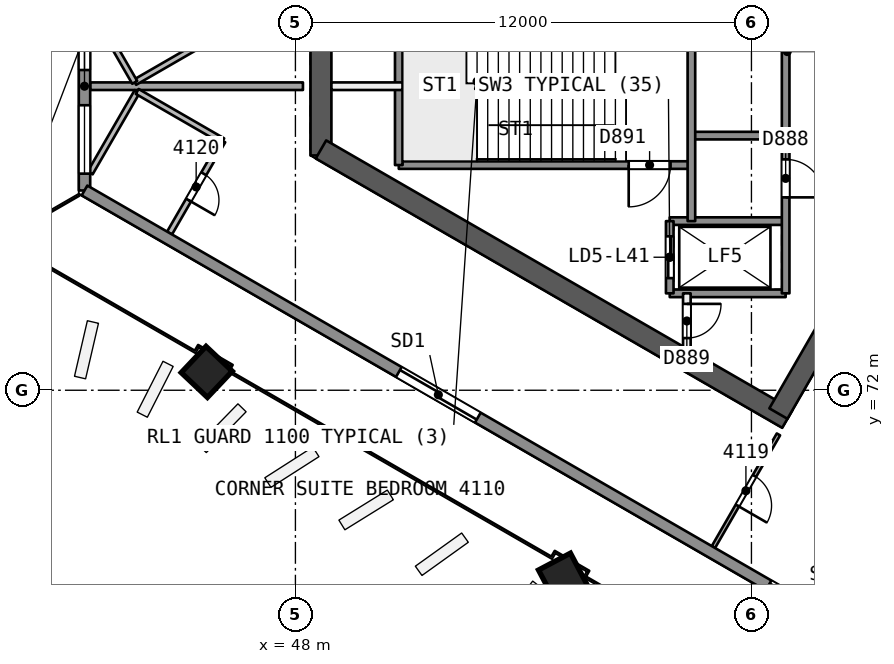
"""IFC4 building model, lengths in metres.
Left out: names, types, materials, properties, quantities, classifications, styles, units other than length and angle.
Written with IfcOpenShell. Run it as: python <this file> out.ifc"""

import sys

from ifc_helpers import new_model, si_unit, direction, frame, frame_2d, origin, origin_2d, place, context, subcontext, project, spatial, rectangle, extrude, element, fill, save


model = new_model("IFC4")
c1 = context("Model", 3, precision=1e-05, world=origin(), true_north=direction((0.0, 1.0)))
c2 = subcontext(c1, "Body", "Model", "MODEL_VIEW")
j1 = project(units=[si_unit("LENGTHUNIT", "METRE"), si_unit("PLANEANGLEUNIT", "RADIAN")], contexts=[c1])
p1 = place(None, origin())
s1 = spatial("IfcSite", under=j1, at=p1, CompositionType="ELEMENT")
p2 = place(p1, origin())
s2 = spatial("IfcBuilding", under=s1, at=p2, CompositionType="ELEMENT")
p3 = place(p2, frame((0.0, 0.0, 171.1)))
s3 = spatial("IfcBuildingStorey", under=s2, at=p3, CompositionType="ELEMENT", Elevation=171.1)
p4 = place(p3, frame((65.682, 80.0, 0.0), z_axis=(0.0, 0.0, 1.0), x_axis=(-0.500000202252, 0.866025287014, 0.0)))
e1 = element("IfcWall", 1, at=p4, inside=s3, PredefinedType="SHEAR", context=c2, shape_type="SweptSolid", body=[
    extrude(rectangle(XDim=10.221, YDim=0.55, at=frame_2d((5.111, 0.0))), origin(), (0.0, 0.0, 1.0), 3.7),
])
p5 = place(p4, frame((0.791, 0.0, 0.0)))
e2 = element("IfcOpeningElement", 2, at=p5, cuts=e1, PredefinedType="OPENING", context=c2, shape_type="SweptSolid", body=[
    extrude(rectangle(XDim=1.2, YDim=2.1, at=frame_2d((0.6, 1.05))), frame((0.0, 0.286, 0.0), z_axis=(0.0, -1.0, 0.0), x_axis=(1.0, 0.0, 0.0)), (0.0, 0.0, 1.0), 0.571),
])
p6 = place(p3, frame((48.672, 81.664, 0.0), z_axis=(0.0, 0.0, 1.0), x_axis=(0.0, -1.0, 0.0)))
e3 = element("IfcWall", 3, at=p6, inside=s3, PredefinedType="SHEAR", context=c2, shape_type="SweptSolid", body=[
    extrude(rectangle(XDim=3.487, YDim=0.55, at=frame_2d((1.743, 0.0))), origin(), (0.0, 0.0, 1.0), 3.7),
])
p7 = place(p3, frame((48.672, 78.336, 0.0), z_axis=(0.0, 0.0, 1.0), x_axis=(0.866023530946, -0.500003243837, 0.0)))
e4 = element("IfcWall", 4, at=p7, inside=s3, PredefinedType="SHEAR", context=c2, shape_type="SweptSolid", body=[
    extrude(rectangle(XDim=14.175, YDim=0.55, at=frame_2d((7.087, 0.0))), origin(), (0.0, 0.0, 1.0), 3.7),
])
p8 = place(p3, frame((60.709, 71.386, 0.0), z_axis=(0.0, 0.0, 1.0), x_axis=(0.500015938302, 0.866016201606, 0.0)))
e5 = element("IfcWall", 5, at=p8, inside=s3, PredefinedType="SHEAR", context=c2, shape_type="SweptSolid", body=[
    extrude(rectangle(XDim=10.105, YDim=0.55, at=frame_2d((5.053, 0.0))), origin(), (0.0, 0.0, 1.0), 3.7),
])
p9 = place(p8, frame((7.955, 0.0, 0.0)))
e6 = element("IfcOpeningElement", 6, at=p9, cuts=e5, PredefinedType="OPENING", context=c2, shape_type="SweptSolid", body=[
    extrude(rectangle(XDim=1.2, YDim=2.1, at=frame_2d((0.6, 1.05))), frame((0.0, 0.286, 0.0), z_axis=(0.0, -1.0, 0.0), x_axis=(1.0, 0.0, 0.0)), (0.0, 0.0, 1.0), 0.571),
])
p10 = place(p3, frame((45.632, 72.474, 0.0), z_axis=(0.02855911485, 0.006793507689, 0.999569019734), x_axis=(-0.865318766308, 0.500768301983, 0.021319953197)))
e7 = element("IfcColumn", 7, at=p10, inside=s3, PredefinedType="COLUMN", context=c2, shape_type="SweptSolid", body=[
    extrude(rectangle(XDim=0.95, YDim=0.95, at=origin_2d()), origin(), (0.0, 0.0, 1.0), 3.702),
])
p11 = place(p3, frame((55.016, 67.057, 0.0), z_axis=(0.019328501455, 0.012204002625, 0.999738701537), x_axis=(-0.8669111048, 0.498348409501, 0.010677037146)))
e8 = element("IfcColumn", 8, at=p11, inside=s3, PredefinedType="COLUMN", context=c2, shape_type="SweptSolid", body=[
    extrude(rectangle(XDim=0.95, YDim=0.95, at=origin_2d()), origin(), (0.0, 0.0, 1.0), 3.701),
])
p12 = place(p3, frame((46.023, 81.401, 0.0), z_axis=(0.0, 0.0, 1.0), x_axis=(-0.866021400173, -0.500006934395, 0.0)))
e9 = element("IfcWall", 9, at=p12, inside=s3, PredefinedType="PARTITIONING", context=c2, shape_type="SweptSolid", body=[
    extrude(rectangle(XDim=2.6, YDim=0.15, at=frame_2d((1.3, 0.0))), origin(), (0.0, 0.0, 1.0), 3.25),
])
p13 = place(p3, frame((43.771, 80.101, 0.0), z_axis=(0.0, 0.0, 1.0), x_axis=(-0.499989728273, 0.866031334088, 0.0)))
e10 = element("IfcWall", 10, at=p13, inside=s3, PredefinedType="PARTITIONING", context=c2, shape_type="SweptSolid", body=[
    extrude(rectangle(XDim=2.346, YDim=0.15, at=frame_2d((1.173, 0.0))), origin(), (0.0, 0.0, 1.0), 3.25),
])
p14 = place(p3, frame((42.599, 80.0, 0.0), z_axis=(0.0, 0.0, 1.0), x_axis=(1.0, 0.0, 0.0)))
e11 = element("IfcWall", 11, at=p14, inside=s3, PredefinedType="PARTITIONING", context=c2, shape_type="SweptSolid", body=[
    extrude(rectangle(XDim=5.599, YDim=0.2, at=frame_2d((2.8, 0.0))), origin(), (0.0, 0.0, 1.0), 3.25),
])
p15 = place(p3, frame((60.71, 70.838, 0.0), z_axis=(0.0, 0.0, 1.0), x_axis=(-0.499981725576, -0.866035954271, 0.0)))
e12 = element("IfcWall", 12, at=p15, inside=s3, PredefinedType="PARTITIONING", context=c2, shape_type="SweptSolid", body=[
    extrude(rectangle(XDim=3.424, YDim=0.1, at=frame_2d((1.712, 0.0))), origin(), (0.0, 0.0, 1.0), 3.25),
])
p16 = place(p15, frame((1.262, 0.0, 0.0)))
e13 = element("IfcOpeningElement", 13, at=p16, cuts=e12, PredefinedType="OPENING", context=c2, shape_type="SweptSolid", body=[
    extrude(rectangle(XDim=0.9, YDim=2.1, at=frame_2d((0.45, 1.05))), frame((0.0, 0.061, 0.0), z_axis=(0.0, -1.0, 0.0), x_axis=(1.0, 0.0, 0.0)), (0.0, 0.0, 1.0), 0.121),
])
p17 = place(p3, frame((42.599, 77.718, 0.0), z_axis=(0.0, 0.0, 1.0), x_axis=(0.499978546328, 0.866037789714, 0.0)))
e14 = element("IfcWall", 14, at=p17, inside=s3, PredefinedType="PARTITIONING", context=c2, shape_type="SweptSolid", body=[
    extrude(rectangle(XDim=2.476, YDim=0.15, at=frame_2d((1.238, 0.0))), origin(), (0.0, 0.0, 1.0), 3.25),
])
p18 = place(p3, frame((43.836, 79.862, 0.0), z_axis=(0.0, 0.0, 1.0), x_axis=(0.866021400173, -0.500006934395, 0.0)))
e15 = element("IfcWall", 15, at=p18, inside=s3, PredefinedType="PARTITIONING", context=c2, shape_type="SweptSolid", body=[
    extrude(rectangle(XDim=2.6, YDim=0.15, at=frame_2d((1.3, 0.0))), origin(), (0.0, 0.0, 1.0), 3.25),
])
p19 = place(p3, frame((46.088, 78.562, 0.0), z_axis=(0.0, 0.0, 1.0), x_axis=(-0.500001639361, -0.866024457297, 0.0)))
e16 = element("IfcWall", 16, at=p19, inside=s3, PredefinedType="PARTITIONING", context=c2, shape_type="SweptSolid", body=[
    extrude(rectangle(XDim=2.801, YDim=0.15, at=frame_2d((1.4, 0.0))), origin(), (0.0, 0.0, 1.0), 3.25),
])
p20 = place(p19, frame((1.0, 0.0, 0.0)))
e17 = element("IfcOpeningElement", 17, at=p20, cuts=e16, PredefinedType="OPENING", context=c2, shape_type="SweptSolid", body=[
    extrude(rectangle(XDim=0.8, YDim=2.1, at=frame_2d((0.4, 1.05))), frame((0.0, 0.085, 0.0), z_axis=(0.0, -1.0, 0.0), x_axis=(1.0, 0.0, 0.0)), (0.0, 0.0, 1.0), 0.171),
])
p21 = place(p3, frame((42.45, 77.256, 0.0), z_axis=(0.0, 0.0, 1.0), x_axis=(0.0, 1.0, 0.0)))
e18 = element("IfcWall", 18, at=p21, inside=s3, PredefinedType="SOLIDWALL", context=c2, shape_type="SweptSolid", body=[
    extrude(rectangle(XDim=5.487, YDim=0.3, at=frame_2d((2.744, 0.0))), origin(), (0.0, 0.0, 1.0), 3.25),
])
p22 = place(p21, frame((3.169, 0.0, 0.9)))
e19 = element("IfcOpeningElement", 19, at=p22, cuts=e18, PredefinedType="OPENING", context=c2, shape_type="SweptSolid", body=[
    extrude(rectangle(XDim=1.8, YDim=1.5, at=frame_2d((0.9, 0.75))), frame((0.0, 0.161, 0.0), z_axis=(0.0, -1.0, 0.0), x_axis=(1.0, 0.0, 0.0)), (0.0, 0.0, 1.0), 0.321),
])
p23 = place(p21, frame((0.443, 0.0, 0.9)))
e20 = element("IfcOpeningElement", 20, at=p23, cuts=e18, PredefinedType="OPENING", context=c2, shape_type="SweptSolid", body=[
    extrude(rectangle(XDim=1.8, YDim=1.5, at=frame_2d((0.9, 0.75))), frame((0.0, 0.161, 0.0), z_axis=(0.0, -1.0, 0.0), x_axis=(1.0, 0.0, 0.0)), (0.0, 0.0, 1.0), 0.321),
])
p24 = place(p3, frame((88.899, 50.439, 0.0), z_axis=(0.0, 0.0, 1.0), x_axis=(-0.866024128163, 0.500002209434, 0.0)))
e21 = element("IfcWall", 21, at=p24, inside=s3, PredefinedType="SOLIDWALL", context=c2, shape_type="SweptSolid", body=[
    extrude(rectangle(XDim=53.635, YDim=0.3, at=frame_2d((26.817, 0.0))), origin(), (0.0, 0.0, 1.0), 3.25),
])
p25 = place(p24, frame((30.45, 0.0, 0.0)))
e22 = element("IfcOpeningElement", 22, at=p25, cuts=e21, PredefinedType="OPENING", context=c2, shape_type="SweptSolid", body=[
    extrude(rectangle(XDim=2.4, YDim=2.4, at=frame_2d((1.2, 1.2))), frame((0.0, 0.161, 0.0), z_axis=(0.0, -1.0, 0.0), x_axis=(1.0, 0.0, 0.0)), (0.0, 0.0, 1.0), 0.321),
])
p26 = place(p24, frame((41.683, 0.0, 0.0)))
e23 = element("IfcOpeningElement", 23, at=p26, cuts=e21, PredefinedType="OPENING", context=c2, shape_type="SweptSolid", body=[
    extrude(rectangle(XDim=2.4, YDim=2.4, at=frame_2d((1.2, 1.2))), frame((0.0, 0.161, 0.0), z_axis=(0.0, -1.0, 0.0), x_axis=(1.0, 0.0, 0.0)), (0.0, 0.0, 1.0), 0.321),
])
p27 = place(p24, frame((10.295, 0.0, 0.0)))
e24 = element("IfcOpeningElement", 24, at=p27, cuts=e21, PredefinedType="OPENING", context=c2, shape_type="SweptSolid", body=[
    extrude(rectangle(XDim=2.4, YDim=2.4, at=frame_2d((1.2, 1.2))), frame((0.0, 0.161, 0.0), z_axis=(0.0, -1.0, 0.0), x_axis=(1.0, 0.0, 0.0)), (0.0, 0.0, 1.0), 0.321),
])
p28 = place(p24, frame((24.982, 0.0, 0.9)))
e25 = element("IfcOpeningElement", 25, at=p28, cuts=e21, PredefinedType="OPENING", context=c2, shape_type="SweptSolid", body=[
    extrude(rectangle(XDim=1.8, YDim=1.5, at=frame_2d((0.9, 0.75))), frame((0.0, 0.161, 0.0), z_axis=(0.0, -1.0, 0.0), x_axis=(1.0, 0.0, 0.0)), (0.0, 0.0, 1.0), 0.321),
])
p29 = place(p3, frame((50.82, 80.0, 0.0), z_axis=(0.0, 0.0, 1.0), x_axis=(-1.0, 0.0, 0.0)))
e26 = element("IfcWall", 26, at=p29, inside=s3, PredefinedType="PARTITIONING", context=c2, shape_type="SweptSolid", body=[
    extrude(rectangle(XDim=1.873, YDim=0.2, at=frame_2d((0.937, 0.0))), origin(), (0.0, 0.0, 1.0), 3.25),
])
p30 = place(p3, frame((60.9, 78.7, 0.0), z_axis=(0.0, 0.0, 1.0), x_axis=(-1.0, 0.0, 0.0)))
e27 = element("IfcWall", 27, at=p30, inside=s3, PredefinedType="SOLIDWALL", context=c2, shape_type="SweptSolid", body=[
    extrude(rectangle(XDim=2.48, YDim=0.2, at=frame_2d((1.24, 0.0))), origin(), (0.0, 0.0, 1.0), 3.25),
])
p31 = place(p3, frame((58.42, 77.925, 0.0), z_axis=(0.0, 0.0, 1.0), x_axis=(-1.0, 0.0, 0.0)))
e28 = element("IfcWall", 28, at=p31, inside=s3, PredefinedType="SOLIDWALL", context=c2, shape_type="SweptSolid", body=[
    extrude(rectangle(XDim=7.7, YDim=0.2, at=frame_2d((3.85, 0.0))), origin(), (0.0, 0.0, 1.0), 3.25),
])
p32 = place(p31, frame((0.55, 0.0, 0.0)))
e29 = element("IfcOpeningElement", 29, at=p32, cuts=e28, PredefinedType="OPENING", context=c2, shape_type="SweptSolid", body=[
    extrude(rectangle(XDim=1.1, YDim=2.1, at=frame_2d((0.55, 1.05))), frame((0.0, 0.11, 0.0), z_axis=(0.0, -1.0, 0.0), x_axis=(1.0, 0.0, 0.0)), (0.0, 0.0, 1.0), 0.221),
])
for number, where, z_axis, x_axis in (
    (30, (60.9, 76.45, 0.0), (0.0, 0.0, 1.0), (-1.0, 0.0, 0.0)),
    (31, (60.9, 74.55, 0.0), (0.0, 0.0, 1.0), (-1.0, 0.0, 0.0)),
):
    element("IfcWall", number, at=place(p3, frame(where, z_axis=z_axis, x_axis=x_axis)), inside=s3, PredefinedType="SOLIDWALL", context=c2, shape_type="SweptSolid", body=[
        extrude(rectangle(XDim=3.05, YDim=0.2, at=frame_2d((1.525, 0.0))), origin(), (0.0, 0.0, 1.0), 3.25),
    ])
p33 = place(p3, frame((60.9, 85.45, 0.0), z_axis=(0.0, 0.0, 1.0), x_axis=(0.0, -1.0, 0.0)))
e32 = element("IfcWall", 32, at=p33, inside=s3, PredefinedType="SOLIDWALL", context=c2, shape_type="SweptSolid", body=[
    extrude(rectangle(XDim=10.9, YDim=0.2, at=frame_2d((5.45, 0.0))), origin(), (0.0, 0.0, 1.0), 3.25),
])
p34 = place(p33, frame((2.875, 0.0, 0.0)))
e33 = element("IfcOpeningElement", 33, at=p34, cuts=e32, PredefinedType="OPENING", context=c2, shape_type="SweptSolid", body=[
    extrude(rectangle(XDim=1.0, YDim=2.1, at=frame_2d((0.5, 1.05))), frame((0.0, 0.11, 0.0), z_axis=(0.0, -1.0, 0.0), x_axis=(1.0, 0.0, 0.0)), (0.0, 0.0, 1.0), 0.221),
])
p35 = place(p33, frame((7.375, 0.0, 0.0)))
e34 = element("IfcOpeningElement", 34, at=p35, cuts=e32, PredefinedType="OPENING", context=c2, shape_type="SweptSolid", body=[
    extrude(rectangle(XDim=1.0, YDim=2.1, at=frame_2d((0.5, 1.05))), frame((0.0, 0.11, 0.0), z_axis=(0.0, -1.0, 0.0), x_axis=(1.0, 0.0, 0.0)), (0.0, 0.0, 1.0), 0.221),
])
p36 = place(p3, frame((58.42, 86.974, 0.0), z_axis=(0.0, 0.0, 1.0), x_axis=(0.0, -1.0, 0.0)))
e35 = element("IfcWall", 35, at=p36, inside=s3, PredefinedType="SOLIDWALL", context=c2, shape_type="SweptSolid", body=[
    extrude(rectangle(XDim=10.524, YDim=0.2, at=frame_2d((5.262, 0.0))), origin(), (0.0, 0.0, 1.0), 3.25),
])
p37 = place(p36, frame((0.312, 0.0, 0.0)))
e36 = element("IfcOpeningElement", 36, at=p37, cuts=e35, PredefinedType="OPENING", context=c2, shape_type="SweptSolid", body=[
    extrude(rectangle(XDim=0.9, YDim=2.1, at=frame_2d((0.45, 1.05))), frame((0.0, 0.11, 0.0), z_axis=(0.0, -1.0, 0.0), x_axis=(1.0, 0.0, 0.0)), (0.0, 0.0, 1.0), 0.221),
])
p38 = place(p3, frame((58.3, 74.55, 0.0), z_axis=(0.0, 0.0, 1.0), x_axis=(0.0, -1.0, 0.0)))
e37 = element("IfcWall", 37, at=p38, inside=s3, PredefinedType="PARTITIONING", context=c2, shape_type="SweptSolid", body=[
    extrude(rectangle(XDim=1.455, YDim=0.2, at=frame_2d((0.728, 0.0))), origin(), (0.0, 0.0, 1.0), 3.25),
])
p39 = place(p38, frame((0.278, 0.0, 0.0)))
e38 = element("IfcOpeningElement", 38, at=p39, cuts=e37, PredefinedType="OPENING", context=c2, shape_type="SweptSolid", body=[
    extrude(rectangle(XDim=0.9, YDim=2.1, at=frame_2d((0.45, 1.05))), frame((0.0, 0.11, 0.0), z_axis=(0.0, -1.0, 0.0), x_axis=(1.0, 0.0, 0.0)), (0.0, 0.0, 1.0), 0.221),
])
p40 = place(p3, frame((57.85, 76.45, 0.0), z_axis=(0.0, 0.0, 1.0), x_axis=(0.0, -1.0, 0.0)))
e39 = element("IfcWall", 39, at=p40, inside=s3, PredefinedType="SOLIDWALL", context=c2, shape_type="SweptSolid", body=[
    extrude(rectangle(XDim=1.9, YDim=0.2, at=frame_2d((0.95, 0.0))), origin(), (0.0, 0.0, 1.0), 3.25),
])
p41 = place(p40, frame((0.4, 0.0, 0.0)))
e40 = element("IfcOpeningElement", 40, at=p41, cuts=e39, PredefinedType="OPENING", context=c2, shape_type="SweptSolid", body=[
    extrude(rectangle(XDim=1.1, YDim=2.1, at=frame_2d((0.55, 1.05))), frame((0.0, 0.11, 0.0), z_axis=(0.0, -1.0, 0.0), x_axis=(1.0, 0.0, 0.0)), (0.0, 0.0, 1.0), 0.221),
])
p42 = place(p3, frame((50.72, 82.075, 0.0), z_axis=(0.0, 0.0, 1.0), x_axis=(0.0, -1.0, 0.0)))
e41 = element("IfcWall", 41, at=p42, inside=s3, PredefinedType="SOLIDWALL", context=c2, shape_type="SweptSolid", body=[
    extrude(rectangle(XDim=4.15, YDim=0.2, at=frame_2d((2.075, 0.0))), origin(), (0.0, 0.0, 1.0), 3.25),
])
p43 = place(p16, origin())
e42 = element("IfcDoor", 42, at=p43, inside=s3, OperationType="SINGLE_SWING_RIGHT", PredefinedType="NOTDEFINED", context=c2, shape_type="SweptSolid", body=[
    extrude(rectangle(XDim=0.9, YDim=2.1, at=frame_2d((0.45, 1.05))), frame((0.0, 0.025, 0.0), z_axis=(0.0, -1.0, 0.0), x_axis=(1.0, 0.0, 0.0)), (0.0, 0.0, 1.0), 0.05),
])
fill(e13, e42)
p44 = place(p20, origin())
e43 = element("IfcDoor", 43, at=p44, inside=s3, OperationType="SINGLE_SWING_RIGHT", PredefinedType="NOTDEFINED", context=c2, shape_type="SweptSolid", body=[
    extrude(rectangle(XDim=0.8, YDim=2.1, at=frame_2d((0.4, 1.05))), frame((0.0, 0.025, 0.0), z_axis=(0.0, -1.0, 0.0), x_axis=(1.0, 0.0, 0.0)), (0.0, 0.0, 1.0), 0.05),
])
fill(e17, e43)
p45 = place(p22, origin())
e44 = element("IfcWindow", 44, at=p45, inside=s3, PartitioningType="SINGLE_PANEL", PredefinedType="WINDOW", context=c2, shape_type="SweptSolid", body=[
    extrude(rectangle(XDim=1.8, YDim=1.5, at=frame_2d((0.9, 0.75))), frame((0.0, 0.03, 0.0), z_axis=(0.0, -1.0, 0.0), x_axis=(1.0, 0.0, 0.0)), (0.0, 0.0, 1.0), 0.06),
])
fill(e19, e44)
p46 = place(p23, origin())
e45 = element("IfcWindow", 45, at=p46, inside=s3, PartitioningType="SINGLE_PANEL", PredefinedType="WINDOW", context=c2, shape_type="SweptSolid", body=[
    extrude(rectangle(XDim=1.8, YDim=1.5, at=frame_2d((0.9, 0.75))), frame((0.0, 0.03, 0.0), z_axis=(0.0, -1.0, 0.0), x_axis=(1.0, 0.0, 0.0)), (0.0, 0.0, 1.0), 0.06),
])
fill(e20, e45)
p47 = place(p26, origin())
e46 = element("IfcDoor", 46, at=p47, inside=s3, OperationType="SLIDING_TO_RIGHT", PredefinedType="NOTDEFINED", context=c2, shape_type="SweptSolid", body=[
    extrude(rectangle(XDim=2.4, YDim=2.4, at=frame_2d((1.2, 1.2))), frame((0.0, 0.025, 0.0), z_axis=(0.0, -1.0, 0.0), x_axis=(1.0, 0.0, 0.0)), (0.0, 0.0, 1.0), 0.05),
])
fill(e23, e46)
p48 = place(p41, origin())
e47 = element("IfcDoor", 47, at=p48, inside=s3, OperationType="SLIDING_TO_RIGHT", PredefinedType="NOTDEFINED", context=c2, shape_type="SweptSolid", body=[
    extrude(rectangle(XDim=1.1, YDim=2.1, at=frame_2d((0.55, 1.05))), frame((0.0, 0.025, 0.0), z_axis=(0.0, -1.0, 0.0), x_axis=(1.0, 0.0, 0.0)), (0.0, 0.0, 1.0), 0.05),
])
fill(e40, e47)
p49 = place(p35, origin())
e48 = element("IfcDoor", 48, at=p49, inside=s3, OperationType="SINGLE_SWING_RIGHT", PredefinedType="NOTDEFINED", context=c2, shape_type="SweptSolid", body=[
    extrude(rectangle(XDim=1.0, YDim=2.1, at=frame_2d((0.5, 1.05))), frame((0.0, 0.025, 0.0), z_axis=(0.0, -1.0, 0.0), x_axis=(1.0, 0.0, 0.0)), (0.0, 0.0, 1.0), 0.05),
])
fill(e34, e48)
p50 = place(p39, origin())
e49 = element("IfcDoor", 49, at=p50, inside=s3, OperationType="SINGLE_SWING_LEFT", PredefinedType="NOTDEFINED", context=c2, shape_type="SweptSolid", body=[
    extrude(rectangle(XDim=0.9, YDim=2.1, at=frame_2d((0.45, 1.05))), frame((0.0, 0.025, 0.0), z_axis=(0.0, -1.0, 0.0), x_axis=(1.0, 0.0, 0.0)), (0.0, 0.0, 1.0), 0.05),
])
fill(e38, e49)
p51 = place(p32, origin())
e50 = element("IfcDoor", 50, at=p51, inside=s3, OperationType="SINGLE_SWING_RIGHT", PredefinedType="NOTDEFINED", context=c2, shape_type="SweptSolid", body=[
    extrude(rectangle(XDim=1.1, YDim=2.1, at=frame_2d((0.55, 1.05))), frame((0.0, 0.025, 0.0), z_axis=(0.0, -1.0, 0.0), x_axis=(1.0, 0.0, 0.0)), (0.0, 0.0, 1.0), 0.05),
])
fill(e29, e50)
save(model, sys.argv[1])
